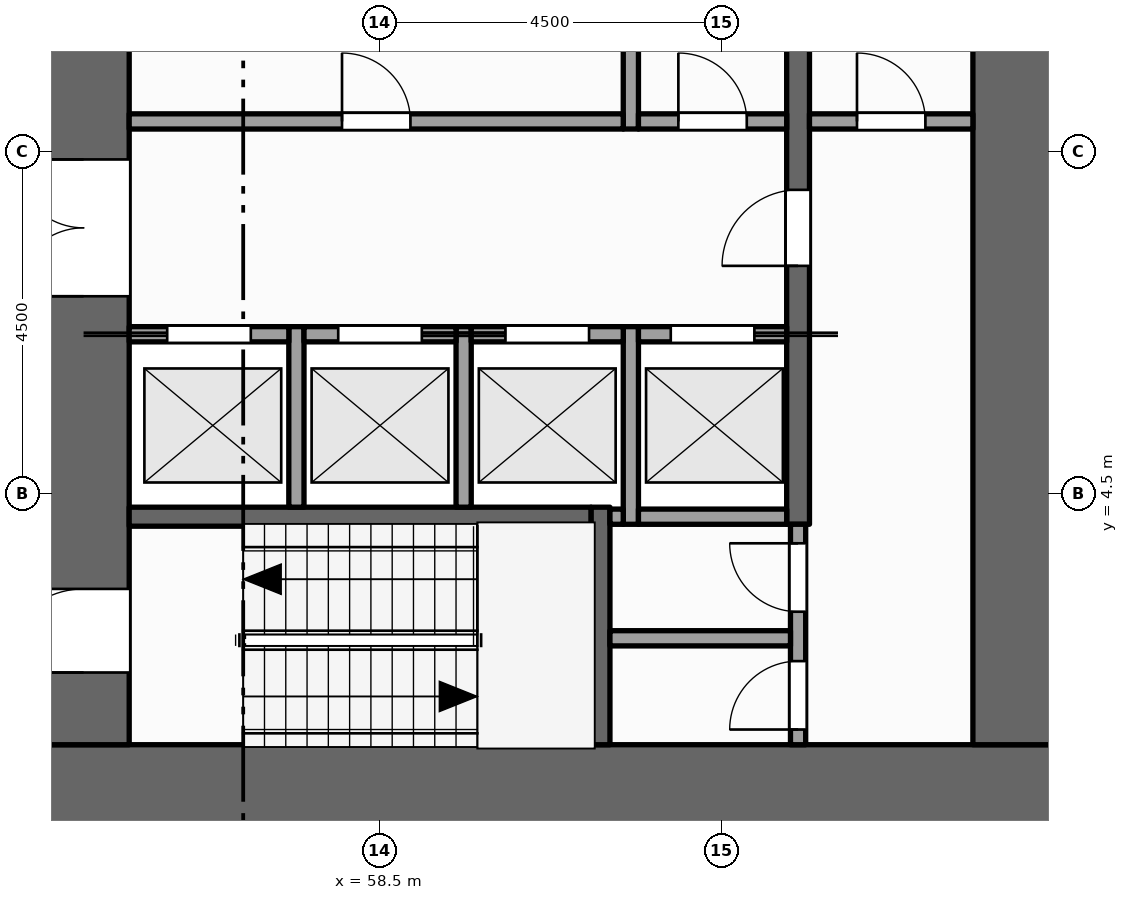
"""IFC4 building model, lengths in metres.
Left out: names, types, materials, properties, quantities, classifications, styles, units other than length and angle.
Written with IfcOpenShell. Run it as: python <this file> out.ifc"""

import sys

from ifc_helpers import new_model, si_unit, direction, frame, frame_2d, origin, place, context, subcontext, project, spatial, rectangle, extrude, element, fill, save


model = new_model("IFC4")
c1 = context("Model", 3, precision=1e-05, world=origin(), true_north=direction((0.0, 1.0)))
c2 = subcontext(c1, "Body", "Model", "MODEL_VIEW")
j1 = project(units=[si_unit("LENGTHUNIT", "METRE"), si_unit("PLANEANGLEUNIT", "RADIAN")], contexts=[c1])
p1 = place(None, origin())
s1 = spatial("IfcSite", under=j1, at=p1, CompositionType="ELEMENT")
p2 = place(p1, origin())
s2 = spatial("IfcBuilding", under=s1, at=p2, CompositionType="ELEMENT")
p3 = place(p2, frame((0.0, 0.0, 73.0)))
s3 = spatial("IfcBuildingStorey", under=s2, at=p3, CompositionType="ELEMENT", Elevation=73.0)
p4 = place(p3, frame((67.5, 0.6, -0.15), z_axis=(0.0, 0.0, 1.0), x_axis=(-1.0, 0.0, 0.0)))
e1 = element("IfcWall", 1, at=p4, inside=s3, PredefinedType="SHEAR", context=c2, shape_type="SweptSolid", body=[
    extrude(rectangle(XDim=13.5, YDim=1.2, at=frame_2d((6.75, 0.0))), origin(), (0.0, 0.0, 1.0), 4.0),
])
p5 = place(p3, frame((54.6, 1.2, -0.15), z_axis=(0.0, 0.0, 1.0), x_axis=(0.0, 1.0, 0.0)))
e2 = element("IfcWall", 2, at=p5, inside=s3, PredefinedType="SHEAR", context=c2, shape_type="SweptSolid", body=[
    extrude(rectangle(XDim=20.1, YDim=1.2, at=frame_2d((10.05, 0.0))), origin(), (0.0, 0.0, 1.0), 4.0),
])
p6 = place(p5, frame((5.9, 0.0, 0.15)))
e3 = element("IfcOpeningElement", 3, at=p6, cuts=e2, PredefinedType="OPENING", context=c2, shape_type="SweptSolid", body=[
    extrude(rectangle(XDim=1.8, YDim=2.1, at=frame_2d((0.9, 1.05))), frame((0.0, 0.61, 0.0), z_axis=(0.0, -1.0, 0.0), x_axis=(1.0, 0.0, 0.0)), (0.0, 0.0, 1.0), 1.22),
])
p7 = place(p5, frame((11.95, 0.0, 0.15)))
e4 = element("IfcOpeningElement", 4, at=p7, cuts=e2, PredefinedType="OPENING", context=c2, shape_type="SweptSolid", body=[
    extrude(rectangle(XDim=1.1, YDim=2.1, at=frame_2d((0.55, 1.05))), frame((0.0, 0.61, 0.0), z_axis=(0.0, -1.0, 0.0), x_axis=(1.0, 0.0, 0.0)), (0.0, 0.0, 1.0), 1.22),
])
p8 = place(p5, frame((0.95, 0.0, 0.15)))
e5 = element("IfcOpeningElement", 5, at=p8, cuts=e2, PredefinedType="OPENING", context=c2, shape_type="SweptSolid", body=[
    extrude(rectangle(XDim=1.1, YDim=2.1, at=frame_2d((0.55, 1.05))), frame((0.0, 0.61, 0.0), z_axis=(0.0, -1.0, 0.0), x_axis=(1.0, 0.0, 0.0)), (0.0, 0.0, 1.0), 1.22),
])
p9 = place(p5, frame((18.15, 0.0, 0.15)))
e6 = element("IfcOpeningElement", 6, at=p9, cuts=e2, PredefinedType="OPENING", context=c2, shape_type="SweptSolid", body=[
    extrude(rectangle(XDim=1.1, YDim=2.1, at=frame_2d((0.55, 1.05))), frame((0.0, 0.61, 0.0), z_axis=(0.0, -1.0, 0.0), x_axis=(1.0, 0.0, 0.0)), (0.0, 0.0, 1.0), 1.22),
])
p10 = place(p3, frame((66.9, 1.2, -0.15), z_axis=(0.0, 0.0, 1.0), x_axis=(0.0, 1.0, 0.0)))
e7 = element("IfcWall", 7, at=p10, inside=s3, PredefinedType="SHEAR", context=c2, shape_type="SweptSolid", body=[
    extrude(rectangle(XDim=20.1, YDim=1.2, at=frame_2d((10.05, 0.0))), origin(), (0.0, 0.0, 1.0), 4.0),
])
for number, where, z_axis, x_axis in (
    (8, (57.4, 4.325, 0.0), (0.0, 0.0, 1.0), (0.0, 1.0, 0.0)),
    (9, (59.6, 4.325, 0.0), (0.0, 0.0, 1.0), (0.0, 1.0, 0.0)),
):
    element("IfcWall", number, at=place(p3, frame(where, z_axis=z_axis, x_axis=x_axis)), inside=s3, PredefinedType="SOLIDWALL", context=c2, shape_type="SweptSolid", body=[
        extrude(rectangle(XDim=2.375, YDim=0.2, at=frame_2d((1.188, 0.0))), origin(), (0.0, 0.0, 1.0), 3.75),
    ])
p11 = place(p3, frame((61.4, 1.2, 0.0), z_axis=(0.0, 0.0, 1.0), x_axis=(0.0, 1.0, 0.0)))
e10 = element("IfcWall", 10, at=p11, inside=s3, PredefinedType="SHEAR", context=c2, shape_type="SweptSolid", body=[
    extrude(rectangle(XDim=3.125, YDim=0.25, at=frame_2d((1.562, 0.0))), origin(), (0.0, 0.0, 1.0), 3.75),
])
p12 = place(p3, frame((61.8, 4.1, 0.0), z_axis=(0.0, 0.0, 1.0), x_axis=(0.0, 1.0, 0.0)))
e11 = element("IfcWall", 11, at=p12, inside=s3, PredefinedType="SOLIDWALL", context=c2, shape_type="SweptSolid", body=[
    extrude(rectangle(XDim=2.6, YDim=0.2, at=frame_2d((1.3, 0.0))), origin(), (0.0, 0.0, 1.0), 3.75),
])
p13 = place(p3, frame((61.8, 9.3, 0.0), z_axis=(0.0, 0.0, 1.0), x_axis=(0.0, 1.0, 0.0)))
e12 = element("IfcWall", 12, at=p13, inside=s3, PredefinedType="PARTITIONING", context=c2, shape_type="SweptSolid", body=[
    extrude(rectangle(XDim=2.6, YDim=0.2, at=frame_2d((1.3, 0.0))), origin(), (0.0, 0.0, 1.0), 3.75),
])
p14 = place(p3, frame((64.0, 1.2, 0.0), z_axis=(0.0, 0.0, 1.0), x_axis=(0.0, 1.0, 0.0)))
e13 = element("IfcWall", 13, at=p14, inside=s3, PredefinedType="PARTITIONING", context=c2, shape_type="SweptSolid", body=[
    extrude(rectangle(XDim=2.9, YDim=0.2, at=frame_2d((1.45, 0.0))), origin(), (0.0, 0.0, 1.0), 3.75),
])
p15 = place(p14, frame((0.2, 0.0, 0.0)))
e14 = element("IfcOpeningElement", 14, at=p15, cuts=e13, PredefinedType="OPENING", context=c2, shape_type="SweptSolid", body=[
    extrude(rectangle(XDim=0.9, YDim=2.1, at=frame_2d((0.45, 1.05))), frame((0.0, 0.11, 0.0), z_axis=(0.0, -1.0, 0.0), x_axis=(1.0, 0.0, 0.0)), (0.0, 0.0, 1.0), 0.22),
])
p16 = place(p14, frame((1.75, 0.0, 0.0)))
e15 = element("IfcOpeningElement", 15, at=p16, cuts=e13, PredefinedType="OPENING", context=c2, shape_type="SweptSolid", body=[
    extrude(rectangle(XDim=0.9, YDim=2.1, at=frame_2d((0.45, 1.05))), frame((0.0, 0.11, 0.0), z_axis=(0.0, -1.0, 0.0), x_axis=(1.0, 0.0, 0.0)), (0.0, 0.0, 1.0), 0.22),
])
p17 = place(p3, frame((64.0, 4.1, 0.0), z_axis=(0.0, 0.0, 1.0), x_axis=(0.0, 1.0, 0.0)))
e16 = element("IfcWall", 16, at=p17, inside=s3, PredefinedType="SHEAR", context=c2, shape_type="SweptSolid", body=[
    extrude(rectangle(XDim=14.5, YDim=0.3, at=frame_2d((7.25, 0.0))), origin(), (0.0, 0.0, 1.0), 3.75),
])
p18 = place(p17, frame((3.4, 0.0, 0.0)))
e17 = element("IfcOpeningElement", 17, at=p18, cuts=e16, PredefinedType="OPENING", context=c2, shape_type="SweptSolid", body=[
    extrude(rectangle(XDim=1.0, YDim=2.1, at=frame_2d((0.5, 1.05))), frame((0.0, 0.16, 0.0), z_axis=(0.0, -1.0, 0.0), x_axis=(1.0, 0.0, 0.0)), (0.0, 0.0, 1.0), 0.32),
])
p19 = place(p17, frame((9.1, 0.0, 0.0)))
e18 = element("IfcOpeningElement", 18, at=p19, cuts=e16, PredefinedType="OPENING", context=c2, shape_type="SweptSolid", body=[
    extrude(rectangle(XDim=1.0, YDim=2.1, at=frame_2d((0.5, 1.05))), frame((0.0, 0.16, 0.0), z_axis=(0.0, -1.0, 0.0), x_axis=(1.0, 0.0, 0.0)), (0.0, 0.0, 1.0), 0.32),
])
p20 = place(p3, frame((61.525, 2.6, 0.0), z_axis=(0.0, 0.0, 1.0), x_axis=(1.0, 0.0, 0.0)))
e19 = element("IfcWall", 19, at=p20, inside=s3, PredefinedType="PARTITIONING", context=c2, shape_type="SweptSolid", body=[
    extrude(rectangle(XDim=2.375, YDim=0.2, at=frame_2d((1.188, 0.0))), origin(), (0.0, 0.0, 1.0), 3.75),
])
p21 = place(p3, frame((55.2, 4.2, 0.0), z_axis=(0.0, 0.0, 1.0), x_axis=(1.0, 0.0, 0.0)))
e20 = element("IfcWall", 20, at=p21, inside=s3, PredefinedType="SHEAR", context=c2, shape_type="SweptSolid", body=[
    extrude(rectangle(XDim=6.075, YDim=0.25, at=frame_2d((3.038, 0.0))), origin(), (0.0, 0.0, 1.0), 3.75),
])
p22 = place(p3, frame((61.525, 4.2, 0.0), z_axis=(0.0, 0.0, 1.0), x_axis=(1.0, 0.0, 0.0)))
e21 = element("IfcWall", 21, at=p22, inside=s3, PredefinedType="SOLIDWALL", context=c2, shape_type="SweptSolid", body=[
    extrude(rectangle(XDim=0.175, YDim=0.2, at=frame_2d((0.087, 0.0))), origin(), (0.0, 0.0, 1.0), 3.75),
])
p23 = place(p3, frame((61.9, 4.2, 0.0), z_axis=(0.0, 0.0, 1.0), x_axis=(1.0, 0.0, 0.0)))
e22 = element("IfcWall", 22, at=p23, inside=s3, PredefinedType="SOLIDWALL", context=c2, shape_type="SweptSolid", body=[
    extrude(rectangle(XDim=1.95, YDim=0.2, at=frame_2d((0.975, 0.0))), origin(), (0.0, 0.0, 1.0), 3.75),
])
p24 = place(p3, frame((55.2, 6.6, 0.0), z_axis=(0.0, 0.0, 1.0), x_axis=(1.0, 0.0, 0.0)))
e23 = element("IfcWall", 23, at=p24, inside=s3, PredefinedType="SOLIDWALL", context=c2, shape_type="SweptSolid", body=[
    extrude(rectangle(XDim=2.1, YDim=0.2, at=frame_2d((1.05, 0.0))), origin(), (0.0, 0.0, 1.0), 3.75),
])
p25 = place(p24, frame((0.5, 0.0, 0.012)))
e24 = element("IfcOpeningElement", 24, at=p25, cuts=e23, PredefinedType="OPENING", context=c2, shape_type="SweptSolid", body=[
    extrude(rectangle(XDim=1.1, YDim=2.1, at=frame_2d((0.55, 1.05))), frame((0.0, 0.11, 0.0), z_axis=(0.0, -1.0, 0.0), x_axis=(1.0, 0.0, 0.0)), (0.0, 0.0, 1.0), 0.22),
])
p26 = place(p3, frame((57.5, 6.6, 0.0), z_axis=(0.0, 0.0, 1.0), x_axis=(1.0, 0.0, 0.0)))
e25 = element("IfcWall", 25, at=p26, inside=s3, PredefinedType="SOLIDWALL", context=c2, shape_type="SweptSolid", body=[
    extrude(rectangle(XDim=2.0, YDim=0.2, at=frame_2d((1.0, 0.0))), origin(), (0.0, 0.0, 1.0), 3.75),
])
p27 = place(p26, frame((0.45, 0.0, 0.012)))
e26 = element("IfcOpeningElement", 26, at=p27, cuts=e25, PredefinedType="OPENING", context=c2, shape_type="SweptSolid", body=[
    extrude(rectangle(XDim=1.1, YDim=2.1, at=frame_2d((0.55, 1.05))), frame((0.0, 0.11, 0.0), z_axis=(0.0, -1.0, 0.0), x_axis=(1.0, 0.0, 0.0)), (0.0, 0.0, 1.0), 0.22),
])
p28 = place(p3, frame((59.7, 6.6, 0.0), z_axis=(0.0, 0.0, 1.0), x_axis=(1.0, 0.0, 0.0)))
e27 = element("IfcWall", 27, at=p28, inside=s3, PredefinedType="SOLIDWALL", context=c2, shape_type="SweptSolid", body=[
    extrude(rectangle(XDim=2.0, YDim=0.2, at=frame_2d((1.0, 0.0))), origin(), (0.0, 0.0, 1.0), 3.75),
])
p29 = place(p28, frame((0.45, 0.0, 0.012)))
e28 = element("IfcOpeningElement", 28, at=p29, cuts=e27, PredefinedType="OPENING", context=c2, shape_type="SweptSolid", body=[
    extrude(rectangle(XDim=1.1, YDim=2.1, at=frame_2d((0.55, 1.05))), frame((0.0, 0.11, 0.0), z_axis=(0.0, -1.0, 0.0), x_axis=(1.0, 0.0, 0.0)), (0.0, 0.0, 1.0), 0.22),
])
p30 = place(p3, frame((61.9, 6.6, 0.0), z_axis=(0.0, 0.0, 1.0), x_axis=(1.0, 0.0, 0.0)))
e29 = element("IfcWall", 29, at=p30, inside=s3, PredefinedType="SOLIDWALL", context=c2, shape_type="SweptSolid", body=[
    extrude(rectangle(XDim=1.95, YDim=0.2, at=frame_2d((0.975, 0.0))), origin(), (0.0, 0.0, 1.0), 3.75),
])
p31 = place(p30, frame((0.425, 0.0, 0.012)))
e30 = element("IfcOpeningElement", 30, at=p31, cuts=e29, PredefinedType="OPENING", context=c2, shape_type="SweptSolid", body=[
    extrude(rectangle(XDim=1.1, YDim=2.1, at=frame_2d((0.55, 1.05))), frame((0.0, 0.11, 0.0), z_axis=(0.0, -1.0, 0.0), x_axis=(1.0, 0.0, 0.0)), (0.0, 0.0, 1.0), 0.22),
])
p32 = place(p3, frame((55.2, 9.4, 0.0), z_axis=(0.0, 0.0, 1.0), x_axis=(1.0, 0.0, 0.0)))
e31 = element("IfcWall", 31, at=p32, inside=s3, PredefinedType="PARTITIONING", context=c2, shape_type="SweptSolid", body=[
    extrude(rectangle(XDim=6.5, YDim=0.2, at=frame_2d((3.25, 0.0))), origin(), (0.0, 0.0, 1.0), 3.75),
])
p33 = place(p32, frame((2.8, 0.0, 0.0)))
e32 = element("IfcOpeningElement", 32, at=p33, cuts=e31, PredefinedType="OPENING", context=c2, shape_type="SweptSolid", body=[
    extrude(rectangle(XDim=0.9, YDim=2.1, at=frame_2d((0.45, 1.05))), frame((0.0, 0.11, 0.0), z_axis=(0.0, -1.0, 0.0), x_axis=(1.0, 0.0, 0.0)), (0.0, 0.0, 1.0), 0.22),
])
p34 = place(p3, frame((61.9, 9.4, 0.0), z_axis=(0.0, 0.0, 1.0), x_axis=(1.0, 0.0, 0.0)))
e33 = element("IfcWall", 33, at=p34, inside=s3, PredefinedType="PARTITIONING", context=c2, shape_type="SweptSolid", body=[
    extrude(rectangle(XDim=1.95, YDim=0.2, at=frame_2d((0.975, 0.0))), origin(), (0.0, 0.0, 1.0), 3.75),
])
p35 = place(p34, frame((0.525, 0.0, 0.0)))
e34 = element("IfcOpeningElement", 34, at=p35, cuts=e33, PredefinedType="OPENING", context=c2, shape_type="SweptSolid", body=[
    extrude(rectangle(XDim=0.9, YDim=2.1, at=frame_2d((0.45, 1.05))), frame((0.0, 0.11, 0.0), z_axis=(0.0, -1.0, 0.0), x_axis=(1.0, 0.0, 0.0)), (0.0, 0.0, 1.0), 0.22),
])
p36 = place(p3, frame((64.15, 9.4, 0.0), z_axis=(0.0, 0.0, 1.0), x_axis=(1.0, 0.0, 0.0)))
e35 = element("IfcWall", 35, at=p36, inside=s3, PredefinedType="PARTITIONING", context=c2, shape_type="SweptSolid", body=[
    extrude(rectangle(XDim=2.15, YDim=0.2, at=frame_2d((1.075, 0.0))), origin(), (0.0, 0.0, 1.0), 3.75),
])
p37 = place(p36, frame((0.625, 0.0, 0.0)))
e36 = element("IfcOpeningElement", 36, at=p37, cuts=e35, PredefinedType="OPENING", context=c2, shape_type="SweptSolid", body=[
    extrude(rectangle(XDim=0.9, YDim=2.1, at=frame_2d((0.45, 1.05))), frame((0.0, 0.11, 0.0), z_axis=(0.0, -1.0, 0.0), x_axis=(1.0, 0.0, 0.0)), (0.0, 0.0, 1.0), 0.22),
])
p38 = place(p25, origin())
e37 = element("IfcDoor", 37, at=p38, inside=s3, OperationType="SLIDING_TO_LEFT", PredefinedType="DOOR", context=c2, shape_type="SweptSolid", body=[
    extrude(rectangle(XDim=1.1, YDim=2.1, at=frame_2d((0.55, 1.05))), frame((0.0, 0.025, 0.0), z_axis=(0.0, -1.0, 0.0), x_axis=(1.0, 0.0, 0.0)), (0.0, 0.0, 1.0), 0.05),
])
fill(e24, e37)
p39 = place(p27, origin())
e38 = element("IfcDoor", 38, at=p39, inside=s3, OperationType="SLIDING_TO_RIGHT", PredefinedType="DOOR", context=c2, shape_type="SweptSolid", body=[
    extrude(rectangle(XDim=1.1, YDim=2.1, at=frame_2d((0.55, 1.05))), frame((0.0, 0.025, 0.0), z_axis=(0.0, -1.0, 0.0), x_axis=(1.0, 0.0, 0.0)), (0.0, 0.0, 1.0), 0.05),
])
fill(e26, e38)
p40 = place(p29, origin())
e39 = element("IfcDoor", 39, at=p40, inside=s3, OperationType="SLIDING_TO_LEFT", PredefinedType="DOOR", context=c2, shape_type="SweptSolid", body=[
    extrude(rectangle(XDim=1.1, YDim=2.1, at=frame_2d((0.55, 1.05))), frame((0.0, 0.025, 0.0), z_axis=(0.0, -1.0, 0.0), x_axis=(1.0, 0.0, 0.0)), (0.0, 0.0, 1.0), 0.05),
])
fill(e28, e39)
p41 = place(p31, origin())
e40 = element("IfcDoor", 40, at=p41, inside=s3, OperationType="SLIDING_TO_RIGHT", PredefinedType="DOOR", context=c2, shape_type="SweptSolid", body=[
    extrude(rectangle(XDim=1.1, YDim=2.1, at=frame_2d((0.55, 1.05))), frame((0.0, 0.025, 0.0), z_axis=(0.0, -1.0, 0.0), x_axis=(1.0, 0.0, 0.0)), (0.0, 0.0, 1.0), 0.05),
])
fill(e30, e40)
p42 = place(p6, origin())
e41 = element("IfcDoor", 41, at=p42, inside=s3, OperationType="DOUBLE_DOOR_SINGLE_SWING", PredefinedType="DOOR", context=c2, shape_type="SweptSolid", body=[
    extrude(rectangle(XDim=1.8, YDim=2.1, at=frame_2d((0.9, 1.05))), frame((0.0, 0.025, 0.0), z_axis=(0.0, -1.0, 0.0), x_axis=(1.0, 0.0, 0.0)), (0.0, 0.0, 1.0), 0.05),
])
fill(e3, e41)
p43 = place(p18, origin())
e42 = element("IfcDoor", 42, at=p43, inside=s3, OperationType="SINGLE_SWING_LEFT", PredefinedType="DOOR", context=c2, shape_type="SweptSolid", body=[
    extrude(rectangle(XDim=1.0, YDim=2.1, at=frame_2d((0.5, 1.05))), frame((0.0, 0.025, 0.0), z_axis=(0.0, -1.0, 0.0), x_axis=(1.0, 0.0, 0.0)), (0.0, 0.0, 1.0), 0.05),
])
fill(e17, e42)
p44 = place(p37, origin())
e43 = element("IfcDoor", 43, at=p44, inside=s3, OperationType="SINGLE_SWING_LEFT", PredefinedType="DOOR", context=c2, shape_type="SweptSolid", body=[
    extrude(rectangle(XDim=0.9, YDim=2.1, at=frame_2d((0.45, 1.05))), frame((0.0, 0.025, 0.0), z_axis=(0.0, -1.0, 0.0), x_axis=(1.0, 0.0, 0.0)), (0.0, 0.0, 1.0), 0.05),
])
fill(e36, e43)
p45 = place(p8, origin())
e44 = element("IfcDoor", 44, at=p45, inside=s3, OperationType="SINGLE_SWING_LEFT", PredefinedType="DOOR", context=c2, shape_type="SweptSolid", body=[
    extrude(rectangle(XDim=1.1, YDim=2.1, at=frame_2d((0.55, 1.05))), frame((0.0, 0.025, 0.0), z_axis=(0.0, -1.0, 0.0), x_axis=(1.0, 0.0, 0.0)), (0.0, 0.0, 1.0), 0.05),
])
fill(e5, e44)
p46 = place(p15, origin())
e45 = element("IfcDoor", 45, at=p46, inside=s3, OperationType="SINGLE_SWING_LEFT", PredefinedType="DOOR", context=c2, shape_type="SweptSolid", body=[
    extrude(rectangle(XDim=0.9, YDim=2.1, at=frame_2d((0.45, 1.05))), frame((0.0, 0.025, 0.0), z_axis=(0.0, -1.0, 0.0), x_axis=(1.0, 0.0, 0.0)), (0.0, 0.0, 1.0), 0.05),
])
fill(e14, e45)
p47 = place(p16, origin())
e46 = element("IfcDoor", 46, at=p47, inside=s3, OperationType="SINGLE_SWING_RIGHT", PredefinedType="DOOR", context=c2, shape_type="SweptSolid", body=[
    extrude(rectangle(XDim=0.9, YDim=2.1, at=frame_2d((0.45, 1.05))), frame((0.0, 0.025, 0.0), z_axis=(0.0, -1.0, 0.0), x_axis=(1.0, 0.0, 0.0)), (0.0, 0.0, 1.0), 0.05),
])
fill(e15, e46)
p48 = place(p33, origin())
e47 = element("IfcDoor", 47, at=p48, inside=s3, OperationType="SINGLE_SWING_LEFT", PredefinedType="DOOR", context=c2, shape_type="SweptSolid", body=[
    extrude(rectangle(XDim=0.9, YDim=2.1, at=frame_2d((0.45, 1.05))), frame((0.0, 0.025, 0.0), z_axis=(0.0, -1.0, 0.0), x_axis=(1.0, 0.0, 0.0)), (0.0, 0.0, 1.0), 0.05),
])
fill(e32, e47)
p49 = place(p35, origin())
e48 = element("IfcDoor", 48, at=p49, inside=s3, OperationType="SINGLE_SWING_LEFT", PredefinedType="DOOR", context=c2, shape_type="SweptSolid", body=[
    extrude(rectangle(XDim=0.9, YDim=2.1, at=frame_2d((0.45, 1.05))), frame((0.0, 0.025, 0.0), z_axis=(0.0, -1.0, 0.0), x_axis=(1.0, 0.0, 0.0)), (0.0, 0.0, 1.0), 0.05),
])
fill(e34, e48)
save(model, sys.argv[1])
